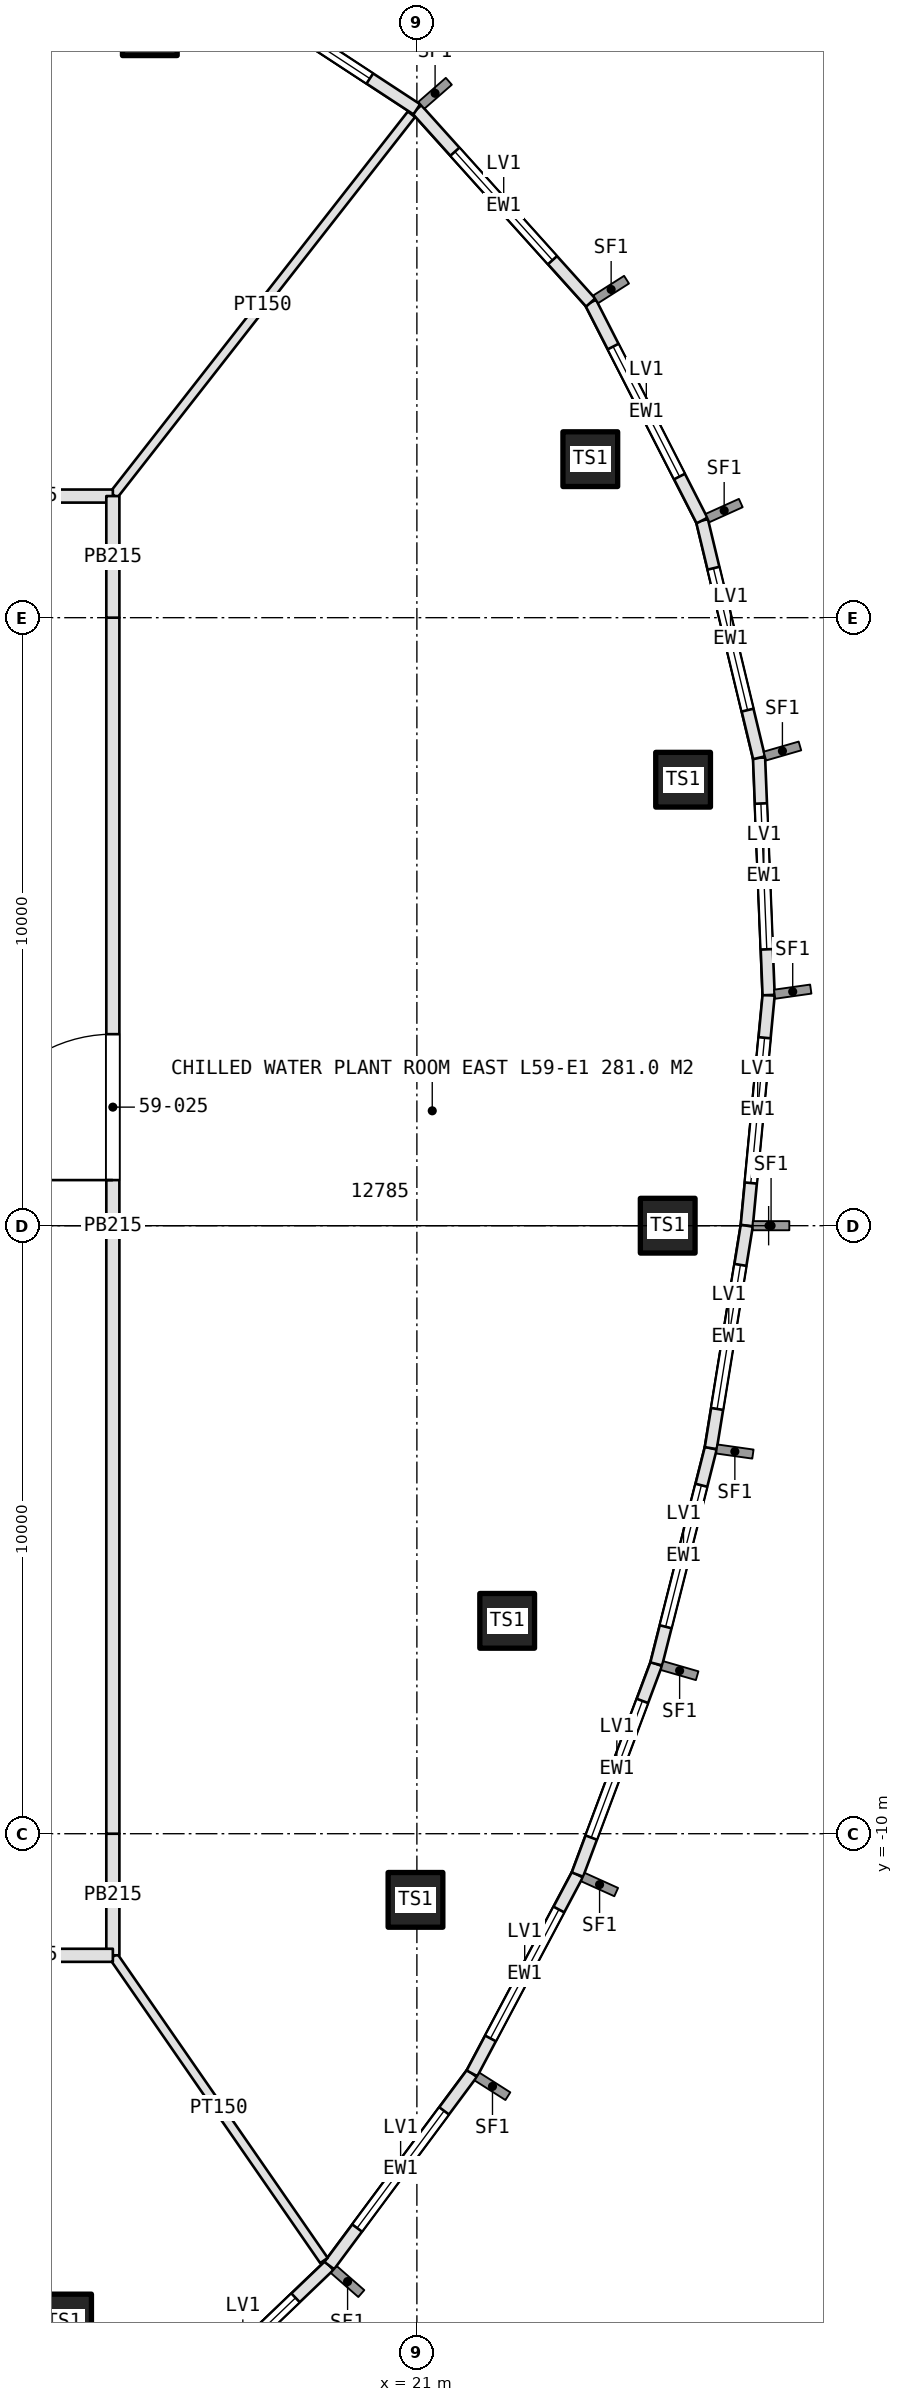
"""IFC4 building model, lengths in metres.
Left out: names, types, materials, properties, quantities, classifications, styles, units other than length and angle.
Written with IfcOpenShell. Run it as: python <this file> out.ifc"""

import sys

from ifc_helpers import new_model, si_unit, direction, frame, frame_2d, origin, origin_2d, place, context, subcontext, project, spatial, rectangle, hollow_rectangle, extrude, element, fill, save


model = new_model("IFC4")
c1 = context("Model", 3, precision=1e-05, world=origin(), true_north=direction((0.0, 1.0)))
c2 = subcontext(c1, "Body", "Model", "MODEL_VIEW")
j1 = project(units=[si_unit("LENGTHUNIT", "METRE"), si_unit("PLANEANGLEUNIT", "RADIAN")], contexts=[c1])
p1 = place(None, origin())
s1 = spatial("IfcSite", under=j1, at=p1, CompositionType="ELEMENT")
p2 = place(p1, origin())
s2 = spatial("IfcBuilding", under=s1, at=p2, CompositionType="ELEMENT")
p3 = place(p2, frame((0.0, 0.0, 266.2)))
s3 = spatial("IfcBuildingStorey", under=s2, at=p3, CompositionType="ELEMENT", Elevation=266.2)
p4 = place(p3, frame((25.125, 0.0, 0.775), z_axis=(-0.515405111385, 0.0, 0.856946655958), x_axis=(0.0, -1.0, 0.0)))
e1 = element("IfcColumn", 1, at=p4, inside=s3, PredefinedType="COLUMN", context=c2, shape_type="SweptSolid", body=[
    extrude(hollow_rectangle(XDim=0.9, YDim=0.9, WallThickness=0.08, at=origin_2d()), origin(), (0.0, 0.0, 1.0), 4.026),
])
p5 = place(p3, frame((25.378, 7.335, 0.775), z_axis=(-0.631726369702, -0.182549674222, 0.753390609355), x_axis=(0.277611158879, -0.960693522652, 0.0)))
e2 = element("IfcColumn", 2, at=p5, inside=s3, PredefinedType="COLUMN", context=c2, shape_type="SweptSolid", body=[
    extrude(hollow_rectangle(XDim=0.9, YDim=0.9, WallThickness=0.08, at=origin_2d()), origin(), (0.0, 0.0, 1.0), 4.579),
])
p6 = place(p3, frame((23.852, 12.607, 0.775), z_axis=(-0.606436450507, -0.320418443873, 0.727713441076), x_axis=(0.467163118871, -0.884171148798, 0.0)))
e3 = element("IfcColumn", 3, at=p6, inside=s3, PredefinedType="COLUMN", context=c2, shape_type="SweptSolid", body=[
    extrude(hollow_rectangle(XDim=0.9, YDim=0.9, WallThickness=0.08, at=origin_2d()), origin(), (0.0, 0.0, 1.0), 4.741),
])
p7 = place(p3, frame((16.608, 19.695, 0.775), z_axis=(-0.345156416479, -0.409346544842, 0.844572350003), x_axis=(0.764502907629, -0.6446202791, 0.0)))
e4 = element("IfcColumn", 4, at=p7, inside=s3, PredefinedType="COLUMN", context=c2, shape_type="SweptSolid", body=[
    extrude(hollow_rectangle(XDim=0.9, YDim=0.9, WallThickness=0.08, at=origin_2d()), origin(), (0.0, 0.0, 1.0), 4.085),
])
for number, where, z_axis, x_axis in (
    (5, (15.198, -18.023, 0.0), (0.0, 0.0, 1.0), (1.0, 0.0, 0.0)),
    (6, (20.977, -11.088, 0.0), (0.0, 0.0, 1.0), (1.0, 0.0, 0.0)),
    (7, (22.485, -6.499, 0.0), (0.0, 0.0, 1.0), (1.0, 0.0, 0.0)),
):
    element("IfcColumn", number, at=place(p3, frame(where, z_axis=z_axis, x_axis=x_axis)), inside=s3, PredefinedType="COLUMN", context=c2, shape_type="SweptSolid", body=[
        extrude(hollow_rectangle(XDim=0.9, YDim=0.9, WallThickness=0.08, at=origin_2d()), origin(), (0.0, 0.0, 1.0), 5.0),
    ])
p8 = place(p3, frame((26.425, 0.0, 0.0), z_axis=(0.0, 0.0, 1.0), x_axis=(0.094388753017, 0.995535415394, 0.0)))
e8 = element("IfcWall", 8, at=p8, inside=s3, PredefinedType="SOLIDWALL", context=c2, shape_type="SweptSolid", body=[
    extrude(rectangle(XDim=3.81, YDim=0.2, at=frame_2d((1.905, 0.0))), origin(), (0.0, 0.0, 1.0), 5.0),
])
p9 = place(p8, frame((0.705, 0.0, 1.6)))
e9 = element("IfcOpeningElement", 9, at=p9, cuts=e8, PredefinedType="OPENING", context=c2, shape_type="SweptSolid", body=[
    extrude(rectangle(XDim=2.4, YDim=1.8, at=frame_2d((1.2, 0.9))), frame((0.0, 0.11, 0.0), z_axis=(0.0, -1.0, 0.0), x_axis=(1.0, 0.0, 0.0)), (0.0, 0.0, 1.0), 0.22),
])
p10 = place(p3, frame((26.785, 3.793, 0.0), z_axis=(0.0, 0.0, 1.0), x_axis=(-0.040315002364, 0.999187019824, 0.0)))
e10 = element("IfcWall", 10, at=p10, inside=s3, PredefinedType="SOLIDWALL", context=c2, shape_type="SweptSolid", body=[
    extrude(rectangle(XDim=3.906, YDim=0.2, at=frame_2d((1.953, 0.0))), origin(), (0.0, 0.0, 1.0), 5.0),
])
p11 = place(p10, frame((0.753, 0.0, 1.6)))
e11 = element("IfcOpeningElement", 11, at=p11, cuts=e10, PredefinedType="OPENING", context=c2, shape_type="SweptSolid", body=[
    extrude(rectangle(XDim=2.4, YDim=1.8, at=frame_2d((1.2, 0.9))), frame((0.0, 0.11, 0.0), z_axis=(0.0, -1.0, 0.0), x_axis=(1.0, 0.0, 0.0)), (0.0, 0.0, 1.0), 0.22),
])
p12 = place(p3, frame((26.627, 7.696, 0.0), z_axis=(0.0, 0.0, 1.0), x_axis=(-0.233821660116, 0.972279502643, 0.0)))
e12 = element("IfcWall", 12, at=p12, inside=s3, PredefinedType="SOLIDWALL", context=c2, shape_type="SweptSolid", body=[
    extrude(rectangle(XDim=4.013, YDim=0.2, at=frame_2d((2.006, 0.0))), origin(), (0.0, 0.0, 1.0), 5.0),
])
p13 = place(p12, frame((0.806, 0.0, 1.6)))
e13 = element("IfcOpeningElement", 13, at=p13, cuts=e12, PredefinedType="OPENING", context=c2, shape_type="SweptSolid", body=[
    extrude(rectangle(XDim=2.4, YDim=1.8, at=frame_2d((1.2, 0.9))), frame((0.0, 0.11, 0.0), z_axis=(0.0, -1.0, 0.0), x_axis=(1.0, 0.0, 0.0)), (0.0, 0.0, 1.0), 0.22),
])
p14 = place(p3, frame((25.689, 11.597, 0.0), z_axis=(0.0, 0.0, 1.0), x_axis=(-0.454861059602, 0.890562415813, 0.0)))
e14 = element("IfcWall", 14, at=p14, inside=s3, PredefinedType="SOLIDWALL", context=c2, shape_type="SweptSolid", body=[
    extrude(rectangle(XDim=4.027, YDim=0.2, at=frame_2d((2.013, 0.0))), origin(), (0.0, 0.0, 1.0), 5.0),
])
p15 = place(p14, frame((0.813, 0.0, 1.6)))
e15 = element("IfcOpeningElement", 15, at=p15, cuts=e14, PredefinedType="OPENING", context=c2, shape_type="SweptSolid", body=[
    extrude(rectangle(XDim=2.4, YDim=1.8, at=frame_2d((1.2, 0.9))), frame((0.0, 0.11, 0.0), z_axis=(0.0, -1.0, 0.0), x_axis=(1.0, 0.0, 0.0)), (0.0, 0.0, 1.0), 0.22),
])
p16 = place(p3, frame((23.857, 15.183, 0.0), z_axis=(0.0, 0.0, 1.0), x_axis=(-0.668829041981, 0.743416244511, 0.0)))
e16 = element("IfcWall", 16, at=p16, inside=s3, PredefinedType="SOLIDWALL", context=c2, shape_type="SweptSolid", body=[
    extrude(rectangle(XDim=4.275, YDim=0.2, at=frame_2d((2.137, 0.0))), origin(), (0.0, 0.0, 1.0), 5.0),
])
p17 = place(p16, frame((0.938, 0.0, 1.6)))
e17 = element("IfcOpeningElement", 17, at=p17, cuts=e16, PredefinedType="OPENING", context=c2, shape_type="SweptSolid", body=[
    extrude(rectangle(XDim=2.4, YDim=1.8, at=frame_2d((1.2, 0.9))), frame((0.0, 0.11, 0.0), z_axis=(0.0, -1.0, 0.0), x_axis=(1.0, 0.0, 0.0)), (0.0, 0.0, 1.0), 0.22),
])
p18 = place(p3, frame((20.998, 18.361, 0.0), z_axis=(0.0, 0.0, 1.0), x_axis=(-0.836341158718, 0.548209327023, 0.0)))
e18 = element("IfcWall", 18, at=p18, inside=s3, PredefinedType="SOLIDWALL", context=c2, shape_type="SweptSolid", body=[
    extrude(rectangle(XDim=4.247, YDim=0.2, at=frame_2d((2.124, 0.0))), origin(), (0.0, 0.0, 1.0), 5.0),
])
p19 = place(p18, frame((0.923, 0.0, 1.6)))
e19 = element("IfcOpeningElement", 19, at=p19, cuts=e18, PredefinedType="OPENING", context=c2, shape_type="SweptSolid", body=[
    extrude(rectangle(XDim=2.4, YDim=1.8, at=frame_2d((1.2, 0.9))), frame((0.0, 0.11, 0.0), z_axis=(0.0, -1.0, 0.0), x_axis=(1.0, 0.0, 0.0)), (0.0, 0.0, 1.0), 0.22),
])
p20 = place(p3, frame((16.716, -19.823, 0.0), z_axis=(0.0, 0.0, 1.0), x_axis=(0.722508444908, 0.691362095458, 0.0)))
e20 = element("IfcWall", 20, at=p20, inside=s3, PredefinedType="SOLIDWALL", context=c2, shape_type="SweptSolid", body=[
    extrude(rectangle(XDim=3.935, YDim=0.2, at=frame_2d((1.967, 0.0))), origin(), (0.0, 0.0, 1.0), 5.0),
])
p21 = place(p20, frame((0.767, 0.0, 1.6)))
e21 = element("IfcOpeningElement", 21, at=p21, cuts=e20, PredefinedType="OPENING", context=c2, shape_type="SweptSolid", body=[
    extrude(rectangle(XDim=2.4, YDim=1.8, at=frame_2d((1.2, 0.9))), frame((0.0, 0.11, 0.0), z_axis=(0.0, -1.0, 0.0), x_axis=(1.0, 0.0, 0.0)), (0.0, 0.0, 1.0), 0.22),
])
p22 = place(p3, frame((19.559, -17.103, 0.0), z_axis=(0.0, 0.0, 1.0), x_axis=(0.596033976517, 0.802959213682, 0.0)))
e22 = element("IfcWall", 22, at=p22, inside=s3, PredefinedType="SOLIDWALL", context=c2, shape_type="SweptSolid", body=[
    extrude(rectangle(XDim=3.937, YDim=0.2, at=frame_2d((1.969, 0.0))), origin(), (0.0, 0.0, 1.0), 5.0),
])
p23 = place(p22, frame((0.769, 0.0, 1.6)))
e23 = element("IfcOpeningElement", 23, at=p23, cuts=e22, PredefinedType="OPENING", context=c2, shape_type="SweptSolid", body=[
    extrude(rectangle(XDim=2.4, YDim=1.8, at=frame_2d((1.2, 0.9))), frame((0.0, 0.11, 0.0), z_axis=(0.0, -1.0, 0.0), x_axis=(1.0, 0.0, 0.0)), (0.0, 0.0, 1.0), 0.22),
])
p24 = place(p3, frame((21.906, -13.941, 0.0), z_axis=(0.0, 0.0, 1.0), x_axis=(0.468618096336, 0.883400860191, 0.0)))
e24 = element("IfcWall", 24, at=p24, inside=s3, PredefinedType="SOLIDWALL", context=c2, shape_type="SweptSolid", body=[
    extrude(rectangle(XDim=3.7, YDim=0.2, at=frame_2d((1.85, 0.0))), origin(), (0.0, 0.0, 1.0), 5.0),
])
p25 = place(p24, frame((0.65, 0.0, 1.6)))
e25 = element("IfcOpeningElement", 25, at=p25, cuts=e24, PredefinedType="OPENING", context=c2, shape_type="SweptSolid", body=[
    extrude(rectangle(XDim=2.4, YDim=1.8, at=frame_2d((1.2, 0.9))), frame((0.0, 0.11, 0.0), z_axis=(0.0, -1.0, 0.0), x_axis=(1.0, 0.0, 0.0)), (0.0, 0.0, 1.0), 0.22),
])
p26 = place(p3, frame((23.64, -10.672, 0.0), z_axis=(0.0, 0.0, 1.0), x_axis=(0.350544822287, 0.936545955929, 0.0)))
e26 = element("IfcWall", 26, at=p26, inside=s3, PredefinedType="SOLIDWALL", context=c2, shape_type="SweptSolid", body=[
    extrude(rectangle(XDim=3.7, YDim=0.2, at=frame_2d((1.85, 0.0))), origin(), (0.0, 0.0, 1.0), 5.0),
])
p27 = place(p26, frame((0.65, 0.0, 1.6)))
e27 = element("IfcOpeningElement", 27, at=p27, cuts=e26, PredefinedType="OPENING", context=c2, shape_type="SweptSolid", body=[
    extrude(rectangle(XDim=2.4, YDim=1.8, at=frame_2d((1.2, 0.9))), frame((0.0, 0.11, 0.0), z_axis=(0.0, -1.0, 0.0), x_axis=(1.0, 0.0, 0.0)), (0.0, 0.0, 1.0), 0.22),
])
p28 = place(p3, frame((24.937, -7.207, 0.0), z_axis=(0.0, 0.0, 1.0), x_axis=(0.244904540495, 0.969547196399, 0.0)))
e28 = element("IfcWall", 28, at=p28, inside=s3, PredefinedType="SOLIDWALL", context=c2, shape_type="SweptSolid", body=[
    extrude(rectangle(XDim=3.661, YDim=0.2, at=frame_2d((1.83, 0.0))), origin(), (0.0, 0.0, 1.0), 5.0),
])
p29 = place(p28, frame((0.63, 0.0, 1.6)))
e29 = element("IfcOpeningElement", 29, at=p29, cuts=e28, PredefinedType="OPENING", context=c2, shape_type="SweptSolid", body=[
    extrude(rectangle(XDim=2.4, YDim=1.8, at=frame_2d((1.2, 0.9))), frame((0.0, 0.11, 0.0), z_axis=(0.0, -1.0, 0.0), x_axis=(1.0, 0.0, 0.0)), (0.0, 0.0, 1.0), 0.22),
])
p30 = place(p3, frame((25.833, -3.658, 0.0), z_axis=(0.0, 0.0, 1.0), x_axis=(0.159696397008, 0.987166176883, 0.0)))
e30 = element("IfcWall", 30, at=p30, inside=s3, PredefinedType="SOLIDWALL", context=c2, shape_type="SweptSolid", body=[
    extrude(rectangle(XDim=3.706, YDim=0.2, at=frame_2d((1.853, 0.0))), origin(), (0.0, 0.0, 1.0), 5.0),
])
p31 = place(p30, frame((0.653, 0.0, 1.6)))
e31 = element("IfcOpeningElement", 31, at=p31, cuts=e30, PredefinedType="OPENING", context=c2, shape_type="SweptSolid", body=[
    extrude(rectangle(XDim=2.4, YDim=1.8, at=frame_2d((1.2, 0.9))), frame((0.0, 0.11, 0.0), z_axis=(0.0, -1.0, 0.0), x_axis=(1.0, 0.0, 0.0)), (0.0, 0.0, 1.0), 0.22),
])
p32 = place(p3, frame((16.011, -12.016, 0.0), z_axis=(0.0, 0.0, 1.0), x_axis=(0.568863489071, -0.822431961199, 0.0)))
e32 = element("IfcWall", 32, at=p32, inside=s3, PredefinedType="PARTITIONING", context=c2, shape_type="SweptSolid", body=[
    extrude(rectangle(XDim=6.083, YDim=0.15, at=frame_2d((3.042, 0.0))), origin(), (0.0, 0.0, 1.0), 4.2),
])
p33 = place(p3, frame((16.012, 12.016, 0.0), z_axis=(0.0, 0.0, 1.0), x_axis=(0.616030058222, 0.787722646219, 0.0)))
e33 = element("IfcWall", 33, at=p33, inside=s3, PredefinedType="PARTITIONING", context=c2, shape_type="SweptSolid", body=[
    extrude(rectangle(XDim=7.952, YDim=0.15, at=frame_2d((3.976, 0.0))), origin(), (0.0, 0.0, 1.0), 4.2),
])
for number, where, z_axis, x_axis in (
    (34, (16.0, 12.0, 0.0), (0.0, 0.0, 1.0), (-1.0, 0.0, 0.0)),
    (35, (16.0, -12.0, 0.0), (0.0, 0.0, 1.0), (0.0, 1.0, 0.0)),
):
    element("IfcWall", number, at=place(p3, frame(where, z_axis=z_axis, x_axis=x_axis)), inside=s3, PredefinedType="PARTITIONING", context=c2, shape_type="SweptSolid", body=[
        extrude(rectangle(XDim=2.0, YDim=0.215, at=frame_2d((1.0, 0.0))), origin(), (0.0, 0.0, 1.0), 4.2),
    ])
p34 = place(p3, frame((16.0, -10.0, 0.0), z_axis=(0.0, 0.0, 1.0), x_axis=(0.0, 1.0, 0.0)))
e36 = element("IfcWall", 36, at=p34, inside=s3, PredefinedType="PARTITIONING", context=c2, shape_type="SweptSolid", body=[
    extrude(rectangle(XDim=20.0, YDim=0.215, at=frame_2d((10.0, 0.0))), origin(), (0.0, 0.0, 1.0), 4.2),
])
p35 = place(p34, frame((10.75, 0.0, 0.0)))
e37 = element("IfcOpeningElement", 37, at=p35, cuts=e36, PredefinedType="OPENING", context=c2, shape_type="SweptSolid", body=[
    extrude(rectangle(XDim=2.4, YDim=2.4, at=frame_2d((1.2, 1.2))), frame((0.0, 0.118, 0.0), z_axis=(0.0, -1.0, 0.0), x_axis=(1.0, 0.0, 0.0)), (0.0, 0.0, 1.0), 0.235),
])
for number, where, z_axis, x_axis in (
    (38, (16.0, 10.0, 0.0), (0.0, 0.0, 1.0), (0.0, 1.0, 0.0)),
    (39, (14.0, -12.0, 0.0), (0.0, 0.0, 1.0), (1.0, 0.0, 0.0)),
):
    element("IfcWall", number, at=place(p3, frame(where, z_axis=z_axis, x_axis=x_axis)), inside=s3, PredefinedType="PARTITIONING", context=c2, shape_type="SweptSolid", body=[
        extrude(rectangle(XDim=2.0, YDim=0.215, at=frame_2d((1.0, 0.0))), origin(), (0.0, 0.0, 1.0), 4.2),
    ])
p36 = place(p9, origin())
e40 = element("IfcWindow", 40, at=p36, inside=s3, PartitioningType="SINGLE_PANEL", PredefinedType="WINDOW", context=c2, shape_type="SweptSolid", body=[
    extrude(rectangle(XDim=2.4, YDim=1.8, at=frame_2d((1.2, 0.9))), frame((0.0, 0.03, 0.0), z_axis=(0.0, -1.0, 0.0), x_axis=(1.0, 0.0, 0.0)), (0.0, 0.0, 1.0), 0.06),
])
fill(e9, e40)
p37 = place(p11, origin())
e41 = element("IfcWindow", 41, at=p37, inside=s3, PartitioningType="SINGLE_PANEL", PredefinedType="WINDOW", context=c2, shape_type="SweptSolid", body=[
    extrude(rectangle(XDim=2.4, YDim=1.8, at=frame_2d((1.2, 0.9))), frame((0.0, 0.03, 0.0), z_axis=(0.0, -1.0, 0.0), x_axis=(1.0, 0.0, 0.0)), (0.0, 0.0, 1.0), 0.06),
])
fill(e11, e41)
p38 = place(p13, origin())
e42 = element("IfcWindow", 42, at=p38, inside=s3, PartitioningType="SINGLE_PANEL", PredefinedType="WINDOW", context=c2, shape_type="SweptSolid", body=[
    extrude(rectangle(XDim=2.4, YDim=1.8, at=frame_2d((1.2, 0.9))), frame((0.0, 0.03, 0.0), z_axis=(0.0, -1.0, 0.0), x_axis=(1.0, 0.0, 0.0)), (0.0, 0.0, 1.0), 0.06),
])
fill(e13, e42)
p39 = place(p15, origin())
e43 = element("IfcWindow", 43, at=p39, inside=s3, PartitioningType="SINGLE_PANEL", PredefinedType="WINDOW", context=c2, shape_type="SweptSolid", body=[
    extrude(rectangle(XDim=2.4, YDim=1.8, at=frame_2d((1.2, 0.9))), frame((0.0, 0.03, 0.0), z_axis=(0.0, -1.0, 0.0), x_axis=(1.0, 0.0, 0.0)), (0.0, 0.0, 1.0), 0.06),
])
fill(e15, e43)
p40 = place(p17, origin())
e44 = element("IfcWindow", 44, at=p40, inside=s3, PartitioningType="SINGLE_PANEL", PredefinedType="WINDOW", context=c2, shape_type="SweptSolid", body=[
    extrude(rectangle(XDim=2.4, YDim=1.8, at=frame_2d((1.2, 0.9))), frame((0.0, 0.03, 0.0), z_axis=(0.0, -1.0, 0.0), x_axis=(1.0, 0.0, 0.0)), (0.0, 0.0, 1.0), 0.06),
])
fill(e17, e44)
p41 = place(p19, origin())
e45 = element("IfcWindow", 45, at=p41, inside=s3, PartitioningType="SINGLE_PANEL", PredefinedType="WINDOW", context=c2, shape_type="SweptSolid", body=[
    extrude(rectangle(XDim=2.4, YDim=1.8, at=frame_2d((1.2, 0.9))), frame((0.0, 0.03, 0.0), z_axis=(0.0, -1.0, 0.0), x_axis=(1.0, 0.0, 0.0)), (0.0, 0.0, 1.0), 0.06),
])
fill(e19, e45)
p42 = place(p21, origin())
e46 = element("IfcWindow", 46, at=p42, inside=s3, PartitioningType="SINGLE_PANEL", PredefinedType="WINDOW", context=c2, shape_type="SweptSolid", body=[
    extrude(rectangle(XDim=2.4, YDim=1.8, at=frame_2d((1.2, 0.9))), frame((0.0, 0.03, 0.0), z_axis=(0.0, -1.0, 0.0), x_axis=(1.0, 0.0, 0.0)), (0.0, 0.0, 1.0), 0.06),
])
fill(e21, e46)
p43 = place(p23, origin())
e47 = element("IfcWindow", 47, at=p43, inside=s3, PartitioningType="SINGLE_PANEL", PredefinedType="WINDOW", context=c2, shape_type="SweptSolid", body=[
    extrude(rectangle(XDim=2.4, YDim=1.8, at=frame_2d((1.2, 0.9))), frame((0.0, 0.03, 0.0), z_axis=(0.0, -1.0, 0.0), x_axis=(1.0, 0.0, 0.0)), (0.0, 0.0, 1.0), 0.06),
])
fill(e23, e47)
p44 = place(p25, origin())
e48 = element("IfcWindow", 48, at=p44, inside=s3, PartitioningType="SINGLE_PANEL", PredefinedType="WINDOW", context=c2, shape_type="SweptSolid", body=[
    extrude(rectangle(XDim=2.4, YDim=1.8, at=frame_2d((1.2, 0.9))), frame((0.0, 0.03, 0.0), z_axis=(0.0, -1.0, 0.0), x_axis=(1.0, 0.0, 0.0)), (0.0, 0.0, 1.0), 0.06),
])
fill(e25, e48)
p45 = place(p27, origin())
e49 = element("IfcWindow", 49, at=p45, inside=s3, PartitioningType="SINGLE_PANEL", PredefinedType="WINDOW", context=c2, shape_type="SweptSolid", body=[
    extrude(rectangle(XDim=2.4, YDim=1.8, at=frame_2d((1.2, 0.9))), frame((0.0, 0.03, 0.0), z_axis=(0.0, -1.0, 0.0), x_axis=(1.0, 0.0, 0.0)), (0.0, 0.0, 1.0), 0.06),
])
fill(e27, e49)
p46 = place(p29, origin())
e50 = element("IfcWindow", 50, at=p46, inside=s3, PartitioningType="SINGLE_PANEL", PredefinedType="WINDOW", context=c2, shape_type="SweptSolid", body=[
    extrude(rectangle(XDim=2.4, YDim=1.8, at=frame_2d((1.2, 0.9))), frame((0.0, 0.03, 0.0), z_axis=(0.0, -1.0, 0.0), x_axis=(1.0, 0.0, 0.0)), (0.0, 0.0, 1.0), 0.06),
])
fill(e29, e50)
p47 = place(p31, origin())
e51 = element("IfcWindow", 51, at=p47, inside=s3, PartitioningType="SINGLE_PANEL", PredefinedType="WINDOW", context=c2, shape_type="SweptSolid", body=[
    extrude(rectangle(XDim=2.4, YDim=1.8, at=frame_2d((1.2, 0.9))), frame((0.0, 0.03, 0.0), z_axis=(0.0, -1.0, 0.0), x_axis=(1.0, 0.0, 0.0)), (0.0, 0.0, 1.0), 0.06),
])
fill(e31, e51)
p48 = place(p35, origin())
e52 = element("IfcDoor", 52, at=p48, inside=s3, OperationType="DOUBLE_DOOR_SINGLE_SWING", PredefinedType="DOOR", context=c2, shape_type="SweptSolid", body=[
    extrude(rectangle(XDim=2.4, YDim=2.4, at=frame_2d((1.2, 1.2))), frame((0.0, 0.025, 0.0), z_axis=(0.0, -1.0, 0.0), x_axis=(1.0, 0.0, 0.0)), (0.0, 0.0, 1.0), 0.05),
])
fill(e37, e52)
save(model, sys.argv[1])
